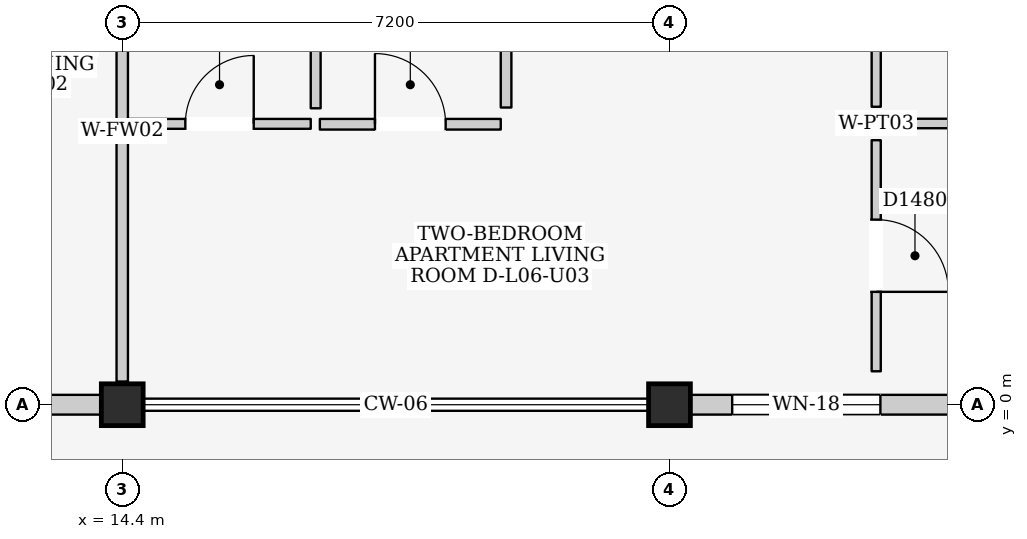
"""IFC4 building model, lengths in metres.
Left out: names, types, materials, properties, quantities, classifications, styles, units other than length and angle.
Written with IfcOpenShell. Run it as: python <this file> out.ifc"""

import sys

from ifc_helpers import new_model, si_unit, direction, frame, frame_2d, origin, origin_2d, place, context, subcontext, project, spatial, rectangle, extrude, element, fill, save


model = new_model("IFC4")
c1 = context("Model", 3, precision=1e-05, world=origin(), true_north=direction((0.0, 1.0)))
c2 = subcontext(c1, "Body", "Model", "MODEL_VIEW")
j1 = project(units=[si_unit("LENGTHUNIT", "METRE"), si_unit("PLANEANGLEUNIT", "RADIAN")], contexts=[c1])
p1 = place(None, origin())
s1 = spatial("IfcSite", under=j1, at=p1, CompositionType="ELEMENT")
p2 = place(p1, origin())
s2 = spatial("IfcBuilding", under=s1, at=p2, CompositionType="ELEMENT")
p3 = place(p2, frame((0.0, 0.0, 21.9)))
s3 = spatial("IfcBuildingStorey", under=s2, at=p3, CompositionType="ELEMENT", Elevation=21.9)
for number, where, z_axis, x_axis in (
    (1, (14.4, 0.0, 0.0), (0.0, 0.0, 1.0), (1.0, 0.0, 0.0)),
    (2, (21.6, 0.0, 0.0), (0.0, 0.0, 1.0), (1.0, 0.0, 0.0)),
):
    element("IfcColumn", number, at=place(p3, frame(where, z_axis=z_axis, x_axis=x_axis)), inside=s3, PredefinedType="COLUMN", context=c2, shape_type="SweptSolid", body=[
        extrude(rectangle(XDim=0.55, YDim=0.55, at=origin_2d()), origin(), (0.0, 0.0, 1.0), 3.2),
    ])
p4 = place(p3, frame((7.475, 0.0, 0.0), z_axis=(0.0, 0.0, 1.0), x_axis=(1.0, 0.0, 0.0)))
e3 = element("IfcWall", 3, at=p4, inside=s3, PredefinedType="ELEMENTEDWALL", context=c2, shape_type="SweptSolid", body=[
    extrude(rectangle(XDim=6.65, YDim=0.26, at=frame_2d((3.325, 0.0))), origin(), (0.0, 0.0, 1.0), 2.515),
])
p5 = place(p4, frame((3.85, 0.0, 0.0)))
e4 = element("IfcOpeningElement", 4, at=p5, cuts=e3, PredefinedType="OPENING", context=c2, shape_type="SweptSolid", body=[
    extrude(rectangle(XDim=1.5, YDim=2.12, at=frame_2d((0.75, 1.06))), frame((0.0, 0.145, 0.0), z_axis=(0.0, -1.0, 0.0), x_axis=(1.0, 0.0, 0.0)), (0.0, 0.0, 1.0), 0.29),
])
p6 = place(p4, frame((0.55, 0.0, 0.9)))
e5 = element("IfcOpeningElement", 5, at=p6, cuts=e3, PredefinedType="OPENING", context=c2, shape_type="SweptSolid", body=[
    extrude(rectangle(XDim=1.45, YDim=1.4, at=frame_2d((0.725, 0.7))), frame((0.0, 0.145, 0.0), z_axis=(0.0, -1.0, 0.0), x_axis=(1.0, 0.0, 0.0)), (0.0, 0.0, 1.0), 0.29),
])
p7 = place(p3, frame((21.875, 0.0, 0.0), z_axis=(0.0, 0.0, 1.0), x_axis=(1.0, 0.0, 0.0)))
e6 = element("IfcWall", 6, at=p7, inside=s3, PredefinedType="ELEMENTEDWALL", context=c2, shape_type="SweptSolid", body=[
    extrude(rectangle(XDim=6.65, YDim=0.26, at=frame_2d((3.325, 0.0))), origin(), (0.0, 0.0, 1.0), 2.515),
])
p8 = place(p7, frame((3.85, 0.0, 0.0)))
e7 = element("IfcOpeningElement", 7, at=p8, cuts=e6, PredefinedType="OPENING", context=c2, shape_type="SweptSolid", body=[
    extrude(rectangle(XDim=2.0, YDim=2.12, at=frame_2d((1.0, 1.06))), frame((0.0, 0.145, 0.0), z_axis=(0.0, -1.0, 0.0), x_axis=(1.0, 0.0, 0.0)), (0.0, 0.0, 1.0), 0.29),
])
p9 = place(p7, frame((0.55, 0.0, 0.855)))
e8 = element("IfcOpeningElement", 8, at=p9, cuts=e6, PredefinedType="OPENING", context=c2, shape_type="SweptSolid", body=[
    extrude(rectangle(XDim=1.95, YDim=1.55, at=frame_2d((0.975, 0.775))), frame((0.0, 0.145, 0.0), z_axis=(0.0, -1.0, 0.0), x_axis=(1.0, 0.0, 0.0)), (0.0, 0.0, 1.0), 0.29),
])
p10 = place(p3, frame((14.4, 0.305, 0.0), z_axis=(0.0, 0.0, 1.0), x_axis=(0.0, 1.0, 0.0)))
e9 = element("IfcWall", 9, at=p10, inside=s3, PredefinedType="PARTITIONING", context=c2, shape_type="SweptSolid", body=[
    extrude(rectangle(XDim=6.59, YDim=0.15, at=frame_2d((3.295, 0.0))), origin(), (0.0, 0.0, 1.0), 2.465),
])
p11 = place(p3, frame((14.48, 3.695, 0.0), z_axis=(0.0, 0.0, 1.0), x_axis=(1.0, 0.0, 0.0)))
e10 = element("IfcWall", 10, at=p11, inside=s3, PredefinedType="PARTITIONING", context=c2, shape_type="SweptSolid", body=[
    extrude(rectangle(XDim=2.4, YDim=0.13, at=frame_2d((1.2, 0.0))), origin(), (0.0, 0.0, 1.0), 2.98),
])
p12 = place(p11, frame((0.75, 0.0, 0.0)))
e11 = element("IfcOpeningElement", 11, at=p12, cuts=e10, PredefinedType="OPENING", context=c2, shape_type="SweptSolid", body=[
    extrude(rectangle(XDim=0.9, YDim=2.1, at=frame_2d((0.45, 1.05))), frame((0.0, 0.08, 0.0), z_axis=(0.0, -1.0, 0.0), x_axis=(1.0, 0.0, 0.0)), (0.0, 0.0, 1.0), 0.16),
])
p13 = place(p3, frame((16.945, 3.9, 0.0), z_axis=(0.0, 0.0, 1.0), x_axis=(0.0, 1.0, 0.0)))
e12 = element("IfcWall", 12, at=p13, inside=s3, PredefinedType="PARTITIONING", context=c2, shape_type="SweptSolid", body=[
    extrude(rectangle(XDim=3.04, YDim=0.13, at=frame_2d((1.52, 0.0))), origin(), (0.0, 0.0, 1.0), 2.98),
])
p14 = place(p3, frame((17.0, 3.69, 0.0), z_axis=(0.0, 0.0, 1.0), x_axis=(1.0, 0.0, 0.0)))
e13 = element("IfcWall", 13, at=p14, inside=s3, PredefinedType="PARTITIONING", context=c2, shape_type="SweptSolid", body=[
    extrude(rectangle(XDim=2.38, YDim=0.14, at=frame_2d((1.19, 0.0))), origin(), (0.0, 0.0, 1.0), 2.98),
])
p15 = place(p14, frame((0.725, 0.0, 0.0)))
e14 = element("IfcOpeningElement", 14, at=p15, cuts=e13, PredefinedType="OPENING", context=c2, shape_type="SweptSolid", body=[
    extrude(rectangle(XDim=0.93, YDim=2.14, at=frame_2d((0.465, 1.07))), frame((0.0, 0.085, 0.0), z_axis=(0.0, -1.0, 0.0), x_axis=(1.0, 0.0, 0.0)), (0.0, 0.0, 1.0), 0.17),
])
p16 = place(p3, frame((19.45, 3.91, 0.0), z_axis=(0.0, 0.0, 1.0), x_axis=(0.0, 1.0, 0.0)))
e15 = element("IfcWall", 15, at=p16, inside=s3, PredefinedType="PARTITIONING", context=c2, shape_type="SweptSolid", body=[
    extrude(rectangle(XDim=3.06, YDim=0.14, at=frame_2d((1.53, 0.0))), origin(), (0.0, 0.0, 1.0), 2.98),
])
p17 = place(p3, frame((24.32, 0.44, 0.0), z_axis=(0.0, 0.0, 1.0), x_axis=(0.0, 1.0, 0.0)))
e16 = element("IfcWall", 16, at=p17, inside=s3, PredefinedType="PARTITIONING", context=c2, shape_type="SweptSolid", body=[
    extrude(rectangle(XDim=3.04, YDim=0.12, at=frame_2d((1.52, 0.0))), origin(), (0.0, 0.0, 1.0), 2.98),
])
p18 = place(p17, frame((1.045, 0.0, 0.0)))
e17 = element("IfcOpeningElement", 17, at=p18, cuts=e16, PredefinedType="OPENING", context=c2, shape_type="SweptSolid", body=[
    extrude(rectangle(XDim=0.95, YDim=2.15, at=frame_2d((0.475, 1.075))), frame((0.0, 0.075, 0.0), z_axis=(0.0, -1.0, 0.0), x_axis=(1.0, 0.0, 0.0)), (0.0, 0.0, 1.0), 0.15),
])
p19 = place(p3, frame((24.52, 3.7, 0.0), z_axis=(0.0, 0.0, 1.0), x_axis=(1.0, 0.0, 0.0)))
e18 = element("IfcWall", 18, at=p19, inside=s3, PredefinedType="PARTITIONING", context=c2, shape_type="SweptSolid", body=[
    extrude(rectangle(XDim=4.06, YDim=0.125, at=frame_2d((2.03, 0.0))), origin(), (0.0, 0.0, 1.0), 2.98),
])
p20 = place(p3, frame((24.32, 3.92, 0.0), z_axis=(0.0, 0.0, 1.0), x_axis=(0.0, 1.0, 0.0)))
e19 = element("IfcWall", 19, at=p20, inside=s3, PredefinedType="PARTITIONING", context=c2, shape_type="SweptSolid", body=[
    extrude(rectangle(XDim=3.04, YDim=0.12, at=frame_2d((1.52, 0.0))), origin(), (0.0, 0.0, 1.0), 2.98),
])
p21 = place(p20, frame((1.04, 0.0, 0.0)))
e20 = element("IfcOpeningElement", 20, at=p21, cuts=e19, PredefinedType="OPENING", context=c2, shape_type="SweptSolid", body=[
    extrude(rectangle(XDim=0.96, YDim=2.15, at=frame_2d((0.48, 1.075))), frame((0.0, 0.075, 0.0), z_axis=(0.0, -1.0, 0.0), x_axis=(1.0, 0.0, 0.0)), (0.0, 0.0, 1.0), 0.15),
])
p22 = place(p9, origin())
e21 = element("IfcWindow", 21, at=p22, inside=s3, PartitioningType="DOUBLE_PANEL_VERTICAL", PredefinedType="WINDOW", context=c2, shape_type="SweptSolid", body=[
    extrude(rectangle(XDim=1.95, YDim=1.55, at=frame_2d((0.975, 0.775))), frame((0.0, 0.03, 0.0), z_axis=(0.0, -1.0, 0.0), x_axis=(1.0, 0.0, 0.0)), (0.0, 0.0, 1.0), 0.06),
])
fill(e8, e21)
p23 = place(p12, origin())
e22 = element("IfcDoor", 22, at=p23, inside=s3, OperationType="SINGLE_SWING_RIGHT", PredefinedType="DOOR", context=c2, shape_type="SweptSolid", body=[
    extrude(rectangle(XDim=0.9, YDim=2.1, at=frame_2d((0.45, 1.05))), frame((0.0, 0.025, 0.0), z_axis=(0.0, -1.0, 0.0), x_axis=(1.0, 0.0, 0.0)), (0.0, 0.0, 1.0), 0.05),
])
fill(e11, e22)
p24 = place(p15, origin())
e23 = element("IfcDoor", 23, at=p24, inside=s3, OperationType="SINGLE_SWING_LEFT", PredefinedType="DOOR", context=c2, shape_type="SweptSolid", body=[
    extrude(rectangle(XDim=0.93, YDim=2.14, at=frame_2d((0.465, 1.07))), frame((0.0, 0.025, 0.0), z_axis=(0.0, -1.0, 0.0), x_axis=(1.0, 0.0, 0.0)), (0.0, 0.0, 1.0), 0.05),
])
fill(e14, e23)
p25 = place(p18, frame((0.95, 0.0, 0.0), z_axis=(0.0, 0.0, 1.0), x_axis=(-1.0, 0.0, 0.0)))
e24 = element("IfcDoor", 24, at=p25, inside=s3, OperationType="SINGLE_SWING_RIGHT", PredefinedType="DOOR", context=c2, shape_type="SweptSolid", body=[
    extrude(rectangle(XDim=0.95, YDim=2.15, at=frame_2d((0.475, 1.075))), frame((0.0, 0.025, 0.0), z_axis=(0.0, -1.0, 0.0), x_axis=(1.0, 0.0, 0.0)), (0.0, 0.0, 1.0), 0.05),
])
fill(e17, e24)
save(model, sys.argv[1])
